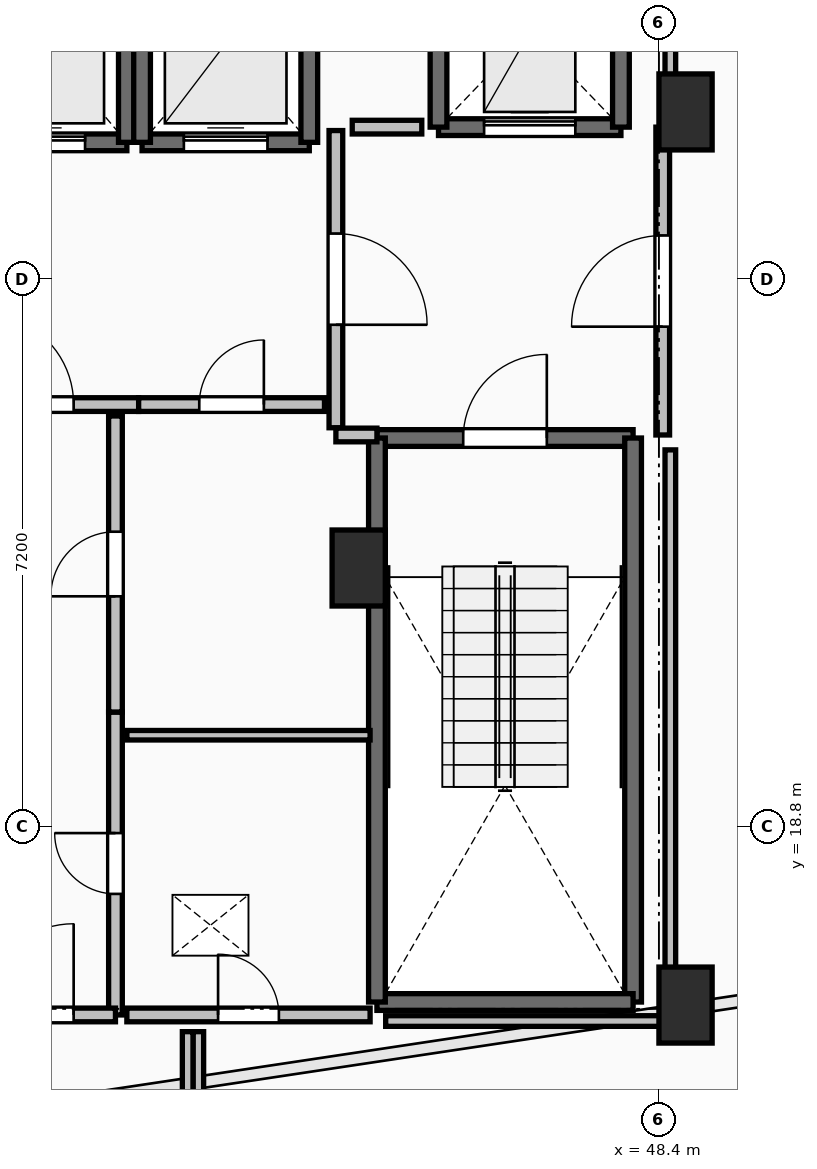
"""IFC4 building model, lengths in metres.
Left out: names, types, materials, properties, quantities, classifications, styles, units other than length and angle.
Written with IfcOpenShell. Run it as: python <this file> out.ifc"""

import sys

from ifc_helpers import new_model, si_unit, direction, frame, frame_2d, origin, origin_2d, place, context, subcontext, project, spatial, rectangle, extrude, element, fill, save


model = new_model("IFC4")
c1 = context("Model", 3, precision=1e-05, world=origin(), true_north=direction((0.0, 1.0)))
c2 = subcontext(c1, "Body", "Model", "MODEL_VIEW")
j1 = project(units=[si_unit("LENGTHUNIT", "METRE"), si_unit("PLANEANGLEUNIT", "RADIAN")], contexts=[c1])
p1 = place(None, origin())
s1 = spatial("IfcSite", under=j1, at=p1, CompositionType="ELEMENT")
p2 = place(p1, origin())
s2 = spatial("IfcBuilding", under=s1, at=p2, CompositionType="ELEMENT")
p3 = place(p2, frame((0.0, 0.0, 241.35)))
s3 = spatial("IfcBuildingStorey", under=s2, at=p3, CompositionType="ELEMENT", Elevation=241.35)
for number, where, z_axis, x_axis in (
    (1, (48.75, 28.2, 0.0), (0.0, 0.0, 1.0), (1.0, 0.0, 0.0)),
    (2, (48.75, 16.45, 0.0), (0.0, 0.0, 1.0), (1.0, 0.0, 0.0)),
    (3, (44.45, 22.2, 0.0), (0.0, 0.0, 1.0), (1.0, 0.0, 0.0)),
):
    element("IfcColumn", number, at=place(p3, frame(where, z_axis=z_axis, x_axis=x_axis)), inside=s3, PredefinedType="PILASTER", context=c2, shape_type="SweptSolid", body=[
        extrude(rectangle(XDim=0.7, YDim=1.0, at=origin_2d()), origin(), (0.0, 0.0, 1.0), 3.55),
    ])
p4 = place(p3, frame((44.69, 23.91, 0.0), z_axis=(0.0, 0.0, 1.0), x_axis=(1.0, 0.0, 0.0)))
e4 = element("IfcWall", 4, at=p4, inside=s3, PredefinedType="SOLIDWALL", context=c2, shape_type="SweptSolid", body=[
    extrude(rectangle(XDim=3.37, YDim=0.22, at=frame_2d((1.685, 0.0))), origin(), (0.0, 0.0, 1.0), 3.29),
])
p5 = place(p4, frame((1.135, 0.0, 0.0)))
e5 = element("IfcOpeningElement", 5, at=p5, cuts=e4, PredefinedType="OPENING", context=c2, shape_type="SweptSolid", body=[
    extrude(rectangle(XDim=1.1, YDim=2.15, at=frame_2d((0.55, 1.075))), frame((0.0, 0.125, 0.0), z_axis=(0.0, -1.0, 0.0), x_axis=(1.0, 0.0, 0.0)), (0.0, 0.0, 1.0), 0.25),
])
p6 = place(p3, frame((48.06, 23.91, 0.0), z_axis=(0.0, 0.0, 1.0), x_axis=(0.0, -1.0, 0.0)))
e6 = element("IfcWall", 6, at=p6, inside=s3, PredefinedType="SOLIDWALL", context=c2, shape_type="SweptSolid", body=[
    extrude(rectangle(XDim=7.42, YDim=0.22, at=frame_2d((3.71, 0.0))), origin(), (0.0, 0.0, 1.0), 3.29),
])
p7 = place(p3, frame((48.06, 16.49, 0.0), z_axis=(0.0, 0.0, 1.0), x_axis=(-1.0, 0.0, 0.0)))
e7 = element("IfcWall", 7, at=p7, inside=s3, PredefinedType="SOLIDWALL", context=c2, shape_type="SweptSolid", body=[
    extrude(rectangle(XDim=3.37, YDim=0.22, at=frame_2d((1.685, 0.0))), origin(), (0.0, 0.0, 1.0), 3.29),
])
p8 = place(p3, frame((44.69, 16.49, 0.0), z_axis=(0.0, 0.0, 1.0), x_axis=(0.0, 1.0, 0.0)))
e8 = element("IfcWall", 8, at=p8, inside=s3, PredefinedType="SOLIDWALL", context=c2, shape_type="SweptSolid", body=[
    extrude(rectangle(XDim=7.42, YDim=0.22, at=frame_2d((3.71, 0.0))), origin(), (0.0, 0.0, 1.0), 3.29),
])
p9 = place(p3, frame((39.2, 27.8, 0.0), z_axis=(0.0, 0.0, 1.0), x_axis=(1.0, 0.0, 0.0)))
e9 = element("IfcWall", 9, at=p9, inside=s3, PredefinedType="SOLIDWALL", context=c2, shape_type="SweptSolid", body=[
    extrude(rectangle(XDim=2.2, YDim=0.22, at=frame_2d((1.1, 0.0))), origin(), (0.0, 0.0, 1.0), 3.29),
])
p10 = place(p9, frame((0.55, 0.0, 0.0)))
e10 = element("IfcOpeningElement", 10, at=p10, cuts=e9, PredefinedType="OPENING", context=c2, shape_type="SweptSolid", body=[
    extrude(rectangle(XDim=1.1, YDim=2.2, at=frame_2d((0.55, 1.1))), frame((0.0, 0.125, 0.0), z_axis=(0.0, -1.0, 0.0), x_axis=(1.0, 0.0, 0.0)), (0.0, 0.0, 1.0), 0.25),
])
p11 = place(p3, frame((41.4, 27.8, 0.0), z_axis=(0.0, 0.0, 1.0), x_axis=(0.0, 1.0, 0.0)))
e11 = element("IfcWall", 11, at=p11, inside=s3, PredefinedType="SOLIDWALL", context=c2, shape_type="SweptSolid", body=[
    extrude(rectangle(XDim=2.6, YDim=0.22, at=frame_2d((1.3, 0.0))), origin(), (0.0, 0.0, 1.0), 3.29),
])
p12 = place(p3, frame((41.6, 27.8, 0.0), z_axis=(0.0, 0.0, 1.0), x_axis=(1.0, 0.0, 0.0)))
e12 = element("IfcWall", 12, at=p12, inside=s3, PredefinedType="SOLIDWALL", context=c2, shape_type="SweptSolid", body=[
    extrude(rectangle(XDim=2.2, YDim=0.22, at=frame_2d((1.1, 0.0))), origin(), (0.0, 0.0, 1.0), 3.29),
])
p13 = place(p12, frame((0.55, 0.0, 0.0)))
e13 = element("IfcOpeningElement", 13, at=p13, cuts=e12, PredefinedType="OPENING", context=c2, shape_type="SweptSolid", body=[
    extrude(rectangle(XDim=1.1, YDim=2.2, at=frame_2d((0.55, 1.1))), frame((0.0, 0.125, 0.0), z_axis=(0.0, -1.0, 0.0), x_axis=(1.0, 0.0, 0.0)), (0.0, 0.0, 1.0), 0.25),
])
for number, where, z_axis, x_axis in (
    (14, (43.8, 27.8, 0.0), (0.0, 0.0, 1.0), (0.0, 1.0, 0.0)),
    (15, (41.6, 30.4, 0.0), (0.0, 0.0, 1.0), (0.0, -1.0, 0.0)),
):
    element("IfcWall", number, at=place(p3, frame(where, z_axis=z_axis, x_axis=x_axis)), inside=s3, PredefinedType="SOLIDWALL", context=c2, shape_type="SweptSolid", body=[
        extrude(rectangle(XDim=2.6, YDim=0.22, at=frame_2d((1.3, 0.0))), origin(), (0.0, 0.0, 1.0), 3.29),
    ])
p14 = place(p3, frame((45.5, 28.0, 0.0), z_axis=(0.0, 0.0, 1.0), x_axis=(1.0, 0.0, 0.0)))
e16 = element("IfcWall", 16, at=p14, inside=s3, PredefinedType="SHEAR", context=c2, shape_type="SweptSolid", body=[
    extrude(rectangle(XDim=2.4, YDim=0.22, at=frame_2d((1.2, 0.0))), origin(), (0.0, 0.0, 1.0), 3.29),
])
p15 = place(p14, frame((0.6, 0.0, 0.0)))
e17 = element("IfcOpeningElement", 17, at=p15, cuts=e16, PredefinedType="OPENING", context=c2, shape_type="SweptSolid", body=[
    extrude(rectangle(XDim=1.2, YDim=2.2, at=frame_2d((0.6, 1.1))), frame((0.0, 0.125, 0.0), z_axis=(0.0, -1.0, 0.0), x_axis=(1.0, 0.0, 0.0)), (0.0, 0.0, 1.0), 0.25),
])
for number, where, z_axis, x_axis in (
    (18, (47.9, 28.0, 0.0), (0.0, 0.0, 1.0), (0.0, 1.0, 0.0)),
    (19, (45.5, 30.5, 0.0), (0.0, 0.0, 1.0), (0.0, -1.0, 0.0)),
):
    element("IfcWall", number, at=place(p3, frame(where, z_axis=z_axis, x_axis=x_axis)), inside=s3, PredefinedType="SHEAR", context=c2, shape_type="SweptSolid", body=[
        extrude(rectangle(XDim=2.5, YDim=0.22, at=frame_2d((1.25, 0.0))), origin(), (0.0, 0.0, 1.0), 3.29),
    ])
p16 = place(p3, frame((44.15, 27.955, 0.0), z_axis=(0.0, 0.0, 1.0), x_axis=(0.0, -1.0, 0.0)))
e20 = element("IfcWall", 20, at=p16, inside=s3, PredefinedType="PARTITIONING", context=c2, shape_type="SweptSolid", body=[
    extrude(rectangle(XDim=3.91, YDim=0.18, at=frame_2d((1.955, 0.0))), origin(), (0.0, 0.0, 1.0), 3.29),
])
p17 = place(p16, frame((1.355, 0.0, 0.0)))
e21 = element("IfcOpeningElement", 21, at=p17, cuts=e20, PredefinedType="OPENING", context=c2, shape_type="SweptSolid", body=[
    extrude(rectangle(XDim=1.2, YDim=2.15, at=frame_2d((0.6, 1.075))), frame((0.0, 0.105, 0.0), z_axis=(0.0, -1.0, 0.0), x_axis=(1.0, 0.0, 0.0)), (0.0, 0.0, 1.0), 0.21),
])
p18 = place(p3, frame((44.15, 23.95, 0.0), z_axis=(0.0, 0.0, 1.0), x_axis=(1.0, 0.0, 0.0)))
e22 = element("IfcWall", 22, at=p18, inside=s3, PredefinedType="PARTITIONING", context=c2, shape_type="SweptSolid", body=[
    extrude(rectangle(XDim=0.54, YDim=0.18, at=frame_2d((0.27, 0.0))), origin(), (0.0, 0.0, 1.0), 3.29),
])
p19 = place(p3, frame((48.45, 23.95, 0.0), z_axis=(0.0, 0.0, 1.0), x_axis=(0.0, 1.0, 0.0)))
e23 = element("IfcWall", 23, at=p19, inside=s3, PredefinedType="PARTITIONING", context=c2, shape_type="SweptSolid", body=[
    extrude(rectangle(XDim=4.05, YDim=0.18, at=frame_2d((2.025, 0.0))), origin(), (0.0, 0.0, 1.0), 3.29),
])
p20 = place(p19, frame((1.425, 0.0, 0.0)))
e24 = element("IfcOpeningElement", 24, at=p20, cuts=e23, PredefinedType="OPENING", context=c2, shape_type="SweptSolid", body=[
    extrude(rectangle(XDim=1.2, YDim=2.15, at=frame_2d((0.6, 1.075))), frame((0.0, 0.105, 0.0), z_axis=(0.0, -1.0, 0.0), x_axis=(1.0, 0.0, 0.0)), (0.0, 0.0, 1.0), 0.21),
])
p21 = place(p3, frame((38.645, 24.35, 0.0), z_axis=(0.0, 0.0, 1.0), x_axis=(1.0, 0.0, 0.0)))
e25 = element("IfcWall", 25, at=p21, inside=s3, PredefinedType="PARTITIONING", context=c2, shape_type="SweptSolid", body=[
    extrude(rectangle(XDim=2.91, YDim=0.18, at=frame_2d((1.455, 0.0))), origin(), (0.0, 0.0, 1.0), 3.29),
])
p22 = place(p21, frame((0.855, 0.0, 0.0)))
e26 = element("IfcOpeningElement", 26, at=p22, cuts=e25, PredefinedType="OPENING", context=c2, shape_type="SweptSolid", body=[
    extrude(rectangle(XDim=1.2, YDim=2.15, at=frame_2d((0.6, 1.075))), frame((0.0, 0.105, 0.0), z_axis=(0.0, -1.0, 0.0), x_axis=(1.0, 0.0, 0.0)), (0.0, 0.0, 1.0), 0.21),
])
p23 = place(p3, frame((41.555, 24.35, 0.0), z_axis=(0.0, 0.0, 1.0), x_axis=(1.0, 0.0, 0.0)))
e27 = element("IfcWall", 27, at=p23, inside=s3, PredefinedType="PARTITIONING", context=c2, shape_type="SweptSolid", body=[
    extrude(rectangle(XDim=2.445, YDim=0.18, at=frame_2d((1.223, 0.0))), origin(), (0.0, 0.0, 1.0), 3.29),
])
p24 = place(p23, frame((0.798, 0.0, 0.0)))
e28 = element("IfcOpeningElement", 28, at=p24, cuts=e27, PredefinedType="OPENING", context=c2, shape_type="SweptSolid", body=[
    extrude(rectangle(XDim=0.85, YDim=2.1, at=frame_2d((0.425, 1.05))), frame((0.0, 0.105, 0.0), z_axis=(0.0, -1.0, 0.0), x_axis=(1.0, 0.0, 0.0)), (0.0, 0.0, 1.0), 0.21),
])
p25 = place(p3, frame((41.25, 16.32, 0.0), z_axis=(0.0, 0.0, 1.0), x_axis=(0.0, 1.0, 0.0)))
e29 = element("IfcWall", 29, at=p25, inside=s3, PredefinedType="PARTITIONING", context=c2, shape_type="SweptSolid", body=[
    extrude(rectangle(XDim=3.985, YDim=0.18, at=frame_2d((1.992, 0.0))), origin(), (0.0, 0.0, 1.0), 3.29),
])
p26 = place(p25, frame((1.593, 0.0, 0.0)))
e30 = element("IfcOpeningElement", 30, at=p26, cuts=e29, PredefinedType="OPENING", context=c2, shape_type="SweptSolid", body=[
    extrude(rectangle(XDim=0.8, YDim=2.05, at=frame_2d((0.4, 1.025))), frame((0.0, 0.105, 0.0), z_axis=(0.0, -1.0, 0.0), x_axis=(1.0, 0.0, 0.0)), (0.0, 0.0, 1.0), 0.21),
])
p27 = place(p3, frame((41.25, 20.305, 0.0), z_axis=(0.0, 0.0, 1.0), x_axis=(0.0, 1.0, 0.0)))
e31 = element("IfcWall", 31, at=p27, inside=s3, PredefinedType="PARTITIONING", context=c2, shape_type="SweptSolid", body=[
    extrude(rectangle(XDim=3.895, YDim=0.18, at=frame_2d((1.948, 0.0))), origin(), (0.0, 0.0, 1.0), 2.482),
])
p28 = place(p27, frame((1.522, 0.0, 0.0)))
e32 = element("IfcOpeningElement", 32, at=p28, cuts=e31, PredefinedType="OPENING", context=c2, shape_type="SweptSolid", body=[
    extrude(rectangle(XDim=0.85, YDim=2.1, at=frame_2d((0.425, 1.05))), frame((0.0, 0.105, 0.0), z_axis=(0.0, -1.0, 0.0), x_axis=(1.0, 0.0, 0.0)), (0.0, 0.0, 1.0), 0.21),
])
p29 = place(p3, frame((38.95, 16.32, 0.0), z_axis=(0.0, 0.0, 1.0), x_axis=(1.0, 0.0, 0.0)))
e33 = element("IfcWall", 33, at=p29, inside=s3, PredefinedType="PARTITIONING", context=c2, shape_type="SweptSolid", body=[
    extrude(rectangle(XDim=2.3, YDim=0.18, at=frame_2d((1.15, 0.0))), origin(), (0.0, 0.0, 1.0), 3.29),
])
p30 = place(p29, frame((0.55, 0.0, 0.0)))
e34 = element("IfcOpeningElement", 34, at=p30, cuts=e33, PredefinedType="OPENING", context=c2, shape_type="SweptSolid", body=[
    extrude(rectangle(XDim=1.2, YDim=2.15, at=frame_2d((0.6, 1.075))), frame((0.0, 0.105, 0.0), z_axis=(0.0, -1.0, 0.0), x_axis=(1.0, 0.0, 0.0)), (0.0, 0.0, 1.0), 0.21),
])
p31 = place(p3, frame((44.6, 20.0, 0.0), z_axis=(0.0, 0.0, 1.0), x_axis=(-1.0, 0.0, 0.0)))
e35 = element("IfcWall", 35, at=p31, inside=s3, PredefinedType="PARTITIONING", context=c2, shape_type="SweptSolid", body=[
    extrude(rectangle(XDim=3.2, YDim=0.125, at=frame_2d((1.6, 0.0))), origin(), (0.0, 0.0, 1.0), 3.29),
])
p32 = place(p3, frame((41.4, 16.32, 0.0), z_axis=(0.0, 0.0, 1.0), x_axis=(1.0, 0.0, 0.0)))
e36 = element("IfcWall", 36, at=p32, inside=s3, PredefinedType="PARTITIONING", context=c2, shape_type="SweptSolid", body=[
    extrude(rectangle(XDim=3.2, YDim=0.18, at=frame_2d((1.6, 0.0))), origin(), (0.0, 0.0, 1.0), 3.29),
])
p33 = place(p32, frame((1.2, 0.0, 0.0)))
e37 = element("IfcOpeningElement", 37, at=p33, cuts=e36, PredefinedType="OPENING", context=c2, shape_type="SweptSolid", body=[
    extrude(rectangle(XDim=0.8, YDim=2.05, at=frame_2d((0.4, 1.025))), frame((0.0, 0.105, 0.0), z_axis=(0.0, -1.0, 0.0), x_axis=(1.0, 0.0, 0.0)), (0.0, 0.0, 1.0), 0.21),
])
p34 = place(p3, frame((45.28, 28.0, 0.0), z_axis=(0.0, 0.0, 1.0), x_axis=(-1.0, 0.0, 0.0)))
e38 = element("IfcWall", 38, at=p34, inside=s3, PredefinedType="PARTITIONING", context=c2, shape_type="SweptSolid", body=[
    extrude(rectangle(XDim=0.915, YDim=0.18, at=frame_2d((0.458, 0.0))), origin(), (0.0, 0.0, 1.0), 3.29),
])
p35 = place(p3, frame((42.34, 14.27, 0.0), z_axis=(0.0, 0.0, 1.0), x_axis=(0.0, 1.0, 0.0)))
e39 = element("IfcWall", 39, at=p35, inside=s3, PredefinedType="PARTITIONING", context=c2, shape_type="SweptSolid", body=[
    extrude(rectangle(XDim=1.83, YDim=0.14, at=frame_2d((0.915, 0.0))), origin(), (0.0, 0.0, 1.0), 3.29),
])
p36 = place(p3, frame((44.805, 16.24, 0.0), z_axis=(0.0, 0.0, 1.0), x_axis=(1.0, 0.0, 0.0)))
e40 = element("IfcWall", 40, at=p36, inside=s3, PredefinedType="PARTITIONING", context=c2, shape_type="SweptSolid", body=[
    extrude(rectangle(XDim=3.745, YDim=0.14, at=frame_2d((1.873, 0.0))), origin(), (0.0, 0.0, 1.0), 2.482),
])
p37 = place(p3, frame((48.55, 16.24, 0.0), z_axis=(0.0, 0.0, 1.0), x_axis=(0.0, 1.0, 0.0)))
e41 = element("IfcWall", 41, at=p37, inside=s3, PredefinedType="PARTITIONING", context=c2, shape_type="SweptSolid", body=[
    extrude(rectangle(XDim=7.514, YDim=0.14, at=frame_2d((3.757, 0.0))), origin(), (0.0, 0.0, 1.0), 2.482),
])
p38 = place(p3, frame((48.55, 28.196, 0.0), z_axis=(0.0, 0.0, 1.0), x_axis=(0.0, 1.0, 0.0)))
e42 = element("IfcWall", 42, at=p38, inside=s3, PredefinedType="PARTITIONING", context=c2, shape_type="SweptSolid", body=[
    extrude(rectangle(XDim=5.254, YDim=0.14, at=frame_2d((2.627, 0.0))), origin(), (0.0, 0.0, 1.0), 2.482),
])
p39 = place(p3, frame((42.2, 16.1, 0.0), z_axis=(0.0, 0.0, 1.0), x_axis=(0.0, -1.0, 0.0)))
e43 = element("IfcWall", 43, at=p39, inside=s3, PredefinedType="PARTITIONING", context=c2, shape_type="SweptSolid", body=[
    extrude(rectangle(XDim=1.83, YDim=0.14, at=frame_2d((0.915, 0.0))), origin(), (0.0, 0.0, 1.0), 3.29),
])
p40 = place(p5, origin())
e44 = element("IfcDoor", 44, at=p40, inside=s3, OperationType="SINGLE_SWING_RIGHT", PredefinedType="DOOR", context=c2, shape_type="SweptSolid", body=[
    extrude(rectangle(XDim=1.1, YDim=2.15, at=frame_2d((0.55, 1.075))), frame((0.0, 0.025, 0.0), z_axis=(0.0, -1.0, 0.0), x_axis=(1.0, 0.0, 0.0)), (0.0, 0.0, 1.0), 0.05),
])
fill(e5, e44)
p41 = place(p10, origin())
e45 = element("IfcDoor", 45, at=p41, inside=s3, OperationType="SLIDING_TO_LEFT", PredefinedType="DOOR", context=c2, shape_type="SweptSolid", body=[
    extrude(rectangle(XDim=1.1, YDim=2.2, at=frame_2d((0.55, 1.1))), frame((0.0, 0.025, 0.0), z_axis=(0.0, -1.0, 0.0), x_axis=(1.0, 0.0, 0.0)), (0.0, 0.0, 1.0), 0.05),
])
fill(e10, e45)
p42 = place(p13, origin())
e46 = element("IfcDoor", 46, at=p42, inside=s3, OperationType="SLIDING_TO_LEFT", PredefinedType="DOOR", context=c2, shape_type="SweptSolid", body=[
    extrude(rectangle(XDim=1.1, YDim=2.2, at=frame_2d((0.55, 1.1))), frame((0.0, 0.025, 0.0), z_axis=(0.0, -1.0, 0.0), x_axis=(1.0, 0.0, 0.0)), (0.0, 0.0, 1.0), 0.05),
])
fill(e13, e46)
p43 = place(p15, origin())
e47 = element("IfcDoor", 47, at=p43, inside=s3, OperationType="SLIDING_TO_LEFT", PredefinedType="DOOR", context=c2, shape_type="SweptSolid", body=[
    extrude(rectangle(XDim=1.2, YDim=2.2, at=frame_2d((0.6, 1.1))), frame((0.0, 0.025, 0.0), z_axis=(0.0, -1.0, 0.0), x_axis=(1.0, 0.0, 0.0)), (0.0, 0.0, 1.0), 0.05),
])
fill(e17, e47)
p44 = place(p17, origin())
e48 = element("IfcDoor", 48, at=p44, inside=s3, OperationType="SINGLE_SWING_RIGHT", PredefinedType="DOOR", context=c2, shape_type="SweptSolid", body=[
    extrude(rectangle(XDim=1.2, YDim=2.15, at=frame_2d((0.6, 1.075))), frame((0.0, 0.025, 0.0), z_axis=(0.0, -1.0, 0.0), x_axis=(1.0, 0.0, 0.0)), (0.0, 0.0, 1.0), 0.05),
])
fill(e21, e48)
p45 = place(p20, origin())
e49 = element("IfcDoor", 49, at=p45, inside=s3, OperationType="SINGLE_SWING_LEFT", PredefinedType="DOOR", context=c2, shape_type="SweptSolid", body=[
    extrude(rectangle(XDim=1.2, YDim=2.15, at=frame_2d((0.6, 1.075))), frame((0.0, 0.025, 0.0), z_axis=(0.0, -1.0, 0.0), x_axis=(1.0, 0.0, 0.0)), (0.0, 0.0, 1.0), 0.05),
])
fill(e24, e49)
p46 = place(p22, origin())
e50 = element("IfcDoor", 50, at=p46, inside=s3, OperationType="SINGLE_SWING_LEFT", PredefinedType="DOOR", context=c2, shape_type="SweptSolid", body=[
    extrude(rectangle(XDim=1.2, YDim=2.15, at=frame_2d((0.6, 1.075))), frame((0.0, 0.025, 0.0), z_axis=(0.0, -1.0, 0.0), x_axis=(1.0, 0.0, 0.0)), (0.0, 0.0, 1.0), 0.05),
])
fill(e26, e50)
p47 = place(p24, origin())
e51 = element("IfcDoor", 51, at=p47, inside=s3, OperationType="SINGLE_SWING_RIGHT", PredefinedType="DOOR", context=c2, shape_type="SweptSolid", body=[
    extrude(rectangle(XDim=0.85, YDim=2.1, at=frame_2d((0.425, 1.05))), frame((0.0, 0.025, 0.0), z_axis=(0.0, -1.0, 0.0), x_axis=(1.0, 0.0, 0.0)), (0.0, 0.0, 1.0), 0.05),
])
fill(e28, e51)
p48 = place(p26, origin())
e52 = element("IfcDoor", 52, at=p48, inside=s3, OperationType="SINGLE_SWING_RIGHT", PredefinedType="DOOR", context=c2, shape_type="SweptSolid", body=[
    extrude(rectangle(XDim=0.8, YDim=2.05, at=frame_2d((0.4, 1.025))), frame((0.0, 0.025, 0.0), z_axis=(0.0, -1.0, 0.0), x_axis=(1.0, 0.0, 0.0)), (0.0, 0.0, 1.0), 0.05),
])
fill(e30, e52)
p49 = place(p28, origin())
e53 = element("IfcDoor", 53, at=p49, inside=s3, OperationType="SINGLE_SWING_LEFT", PredefinedType="DOOR", context=c2, shape_type="SweptSolid", body=[
    extrude(rectangle(XDim=0.85, YDim=2.1, at=frame_2d((0.425, 1.05))), frame((0.0, 0.025, 0.0), z_axis=(0.0, -1.0, 0.0), x_axis=(1.0, 0.0, 0.0)), (0.0, 0.0, 1.0), 0.05),
])
fill(e32, e53)
p50 = place(p30, origin())
e54 = element("IfcDoor", 54, at=p50, inside=s3, OperationType="SINGLE_SWING_RIGHT", PredefinedType="DOOR", context=c2, shape_type="SweptSolid", body=[
    extrude(rectangle(XDim=1.2, YDim=2.15, at=frame_2d((0.6, 1.075))), frame((0.0, 0.025, 0.0), z_axis=(0.0, -1.0, 0.0), x_axis=(1.0, 0.0, 0.0)), (0.0, 0.0, 1.0), 0.05),
])
fill(e34, e54)
p51 = place(p33, origin())
e55 = element("IfcDoor", 55, at=p51, inside=s3, OperationType="SINGLE_SWING_LEFT", PredefinedType="DOOR", context=c2, shape_type="SweptSolid", body=[
    extrude(rectangle(XDim=0.8, YDim=2.05, at=frame_2d((0.4, 1.025))), frame((0.0, 0.025, 0.0), z_axis=(0.0, -1.0, 0.0), x_axis=(1.0, 0.0, 0.0)), (0.0, 0.0, 1.0), 0.05),
])
fill(e37, e55)
save(model, sys.argv[1])
